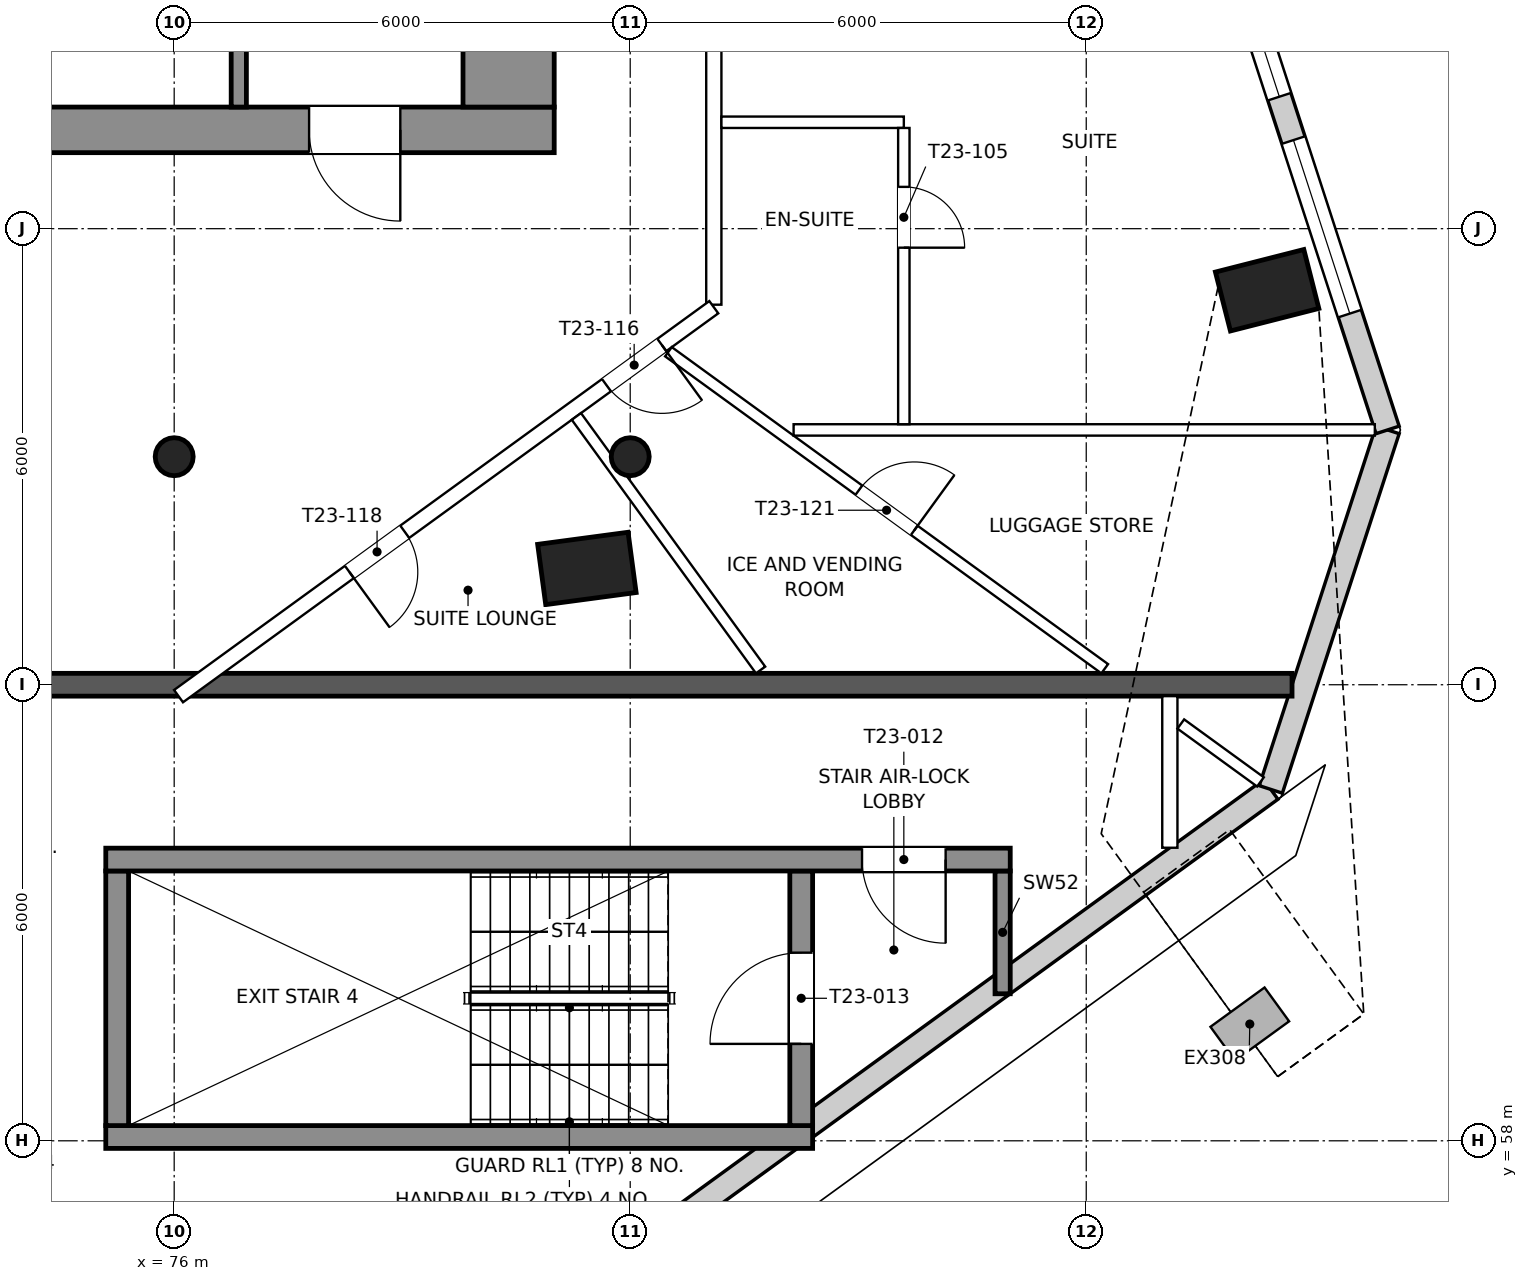
"""IFC4 building model, lengths in metres.
Left out: names, types, materials, properties, quantities, classifications, styles, units other than length and angle.
Written with IfcOpenShell. Run it as: python <this file> out.ifc"""

import sys

from ifc_helpers import new_model, si_unit, direction, frame, frame_2d, origin, origin_2d, place, context, subcontext, project, spatial, rectangle, circle, extrude, element, fill, save


model = new_model("IFC4")
c1 = context("Model", 3, precision=1e-05, world=origin(), true_north=direction((0.0, 1.0)))
c2 = subcontext(c1, "Body", "Model", "MODEL_VIEW")
j1 = project(units=[si_unit("LENGTHUNIT", "METRE"), si_unit("PLANEANGLEUNIT", "RADIAN")], contexts=[c1])
p1 = place(None, origin())
s1 = spatial("IfcSite", under=j1, at=p1, CompositionType="ELEMENT")
p2 = place(p1, origin())
s2 = spatial("IfcBuilding", under=s1, at=p2, CompositionType="ELEMENT")
p3 = place(p2, frame((0.0, 0.0, 317.8)))
s3 = spatial("IfcBuildingStorey", under=s2, at=p3, CompositionType="ELEMENT", Elevation=317.8)
for number, where, z_axis, x_axis in (
    (1, (90.38, 69.19, 0.0), (0.0, 0.0, 1.0), (0.247, -0.969, 0.0)),
    (2, (81.43, 65.53, 0.0), (0.0, 0.0, 1.0), (0.133, -0.991, 0.0)),
):
    element("IfcColumn", number, at=place(p3, frame(where, z_axis=z_axis, x_axis=x_axis)), inside=s3, PredefinedType="COLUMN", context=c2, shape_type="SweptSolid", body=[
        extrude(rectangle(XDim=0.8, YDim=1.2, at=origin_2d()), origin(), (0.0, 0.0, 1.0), 3.9),
    ])
for number, where, z_axis, x_axis in (
    (3, (76.0, 67.0, 0.0), (0.0, 0.0, 1.0), (1.0, 0.0, 0.0)),
    (4, (82.0, 67.0, 0.0), (0.0, 0.0, 1.0), (1.0, 0.0, 0.0)),
):
    element("IfcColumn", number, at=place(p3, frame(where, z_axis=z_axis, x_axis=x_axis)), inside=s3, PredefinedType="COLUMN", context=c2, shape_type="SweptSolid", body=[
        extrude(circle(Radius=0.25, at=origin_2d()), origin(), (0.0, 0.0, 1.0), 3.9),
    ])
p4 = place(p3, frame((73.427, 50.271, 0.0), z_axis=(0.0, 0.0, 1.0), x_axis=(0.809016820716, 0.587785491314, 0.0)))
e5 = element("IfcWall", 5, at=p4, inside=s3, PredefinedType="SOLIDWALL", context=c2, shape_type="SweptSolid", body=[
    extrude(rectangle(XDim=21.015, YDim=0.32, at=frame_2d((10.507, 0.0))), origin(), (0.0, 0.0, 1.0), 3.5),
])
p5 = place(p4, frame((1.807, 0.0, 0.55)))
e6 = element("IfcOpeningElement", 6, at=p5, cuts=e5, PredefinedType="OPENING", context=c2, shape_type="SweptSolid", body=[
    extrude(rectangle(XDim=2.4, YDim=2.3, at=frame_2d((1.2, 1.15))), frame((0.0, 0.17, 0.0), z_axis=(0.0, -1.0, 0.0), x_axis=(1.0, 0.0, 0.0)), (0.0, 0.0, 1.0), 0.34),
])
p6 = place(p4, frame((4.807, 0.0, 0.55)))
e7 = element("IfcOpeningElement", 7, at=p6, cuts=e5, PredefinedType="OPENING", context=c2, shape_type="SweptSolid", body=[
    extrude(rectangle(XDim=2.4, YDim=2.3, at=frame_2d((1.2, 1.15))), frame((0.0, 0.17, 0.0), z_axis=(0.0, -1.0, 0.0), x_axis=(1.0, 0.0, 0.0)), (0.0, 0.0, 1.0), 0.34),
])
p7 = place(p3, frame((90.428, 62.623, 0.0), z_axis=(0.0, 0.0, 1.0), x_axis=(0.309016131261, 0.951056796737, 0.0)))
e8 = element("IfcWall", 8, at=p7, inside=s3, PredefinedType="SOLIDWALL", context=c2, shape_type="SweptSolid", body=[
    extrude(rectangle(XDim=4.973, YDim=0.32, at=frame_2d((2.486, 0.0))), origin(), (0.0, 0.0, 1.0), 3.5),
])
p8 = place(p3, frame((91.965, 67.352, 0.0), z_axis=(0.0, 0.0, 1.0), x_axis=(-0.309018707068, 0.951055959806, 0.0)))
e9 = element("IfcWall", 9, at=p8, inside=s3, PredefinedType="SOLIDWALL", context=c2, shape_type="SweptSolid", body=[
    extrude(rectangle(XDim=17.619, YDim=0.32, at=frame_2d((8.81, 0.0))), origin(), (0.0, 0.0, 1.0), 3.5),
])
p9 = place(p8, frame((1.609, 0.0, 0.55)))
e10 = element("IfcOpeningElement", 10, at=p9, cuts=e9, PredefinedType="OPENING", context=c2, shape_type="SweptSolid", body=[
    extrude(rectangle(XDim=2.4, YDim=2.3, at=frame_2d((1.2, 1.15))), frame((0.0, 0.17, 0.0), z_axis=(0.0, -1.0, 0.0), x_axis=(1.0, 0.0, 0.0)), (0.0, 0.0, 1.0), 0.34),
])
p10 = place(p8, frame((4.609, 0.0, 0.55)))
e11 = element("IfcOpeningElement", 11, at=p10, cuts=e9, PredefinedType="OPENING", context=c2, shape_type="SweptSolid", body=[
    extrude(rectangle(XDim=2.4, YDim=2.3, at=frame_2d((1.2, 1.15))), frame((0.0, 0.17, 0.0), z_axis=(0.0, -1.0, 0.0), x_axis=(1.0, 0.0, 0.0)), (0.0, 0.0, 1.0), 0.34),
])
p11 = place(p8, frame((7.609, 0.0, 0.55)))
e12 = element("IfcOpeningElement", 12, at=p11, cuts=e9, PredefinedType="OPENING", context=c2, shape_type="SweptSolid", body=[
    extrude(rectangle(XDim=2.4, YDim=2.3, at=frame_2d((1.2, 1.15))), frame((0.0, 0.17, 0.0), z_axis=(0.0, -1.0, 0.0), x_axis=(1.0, 0.0, 0.0)), (0.0, 0.0, 1.0), 0.34),
])
p12 = place(p8, frame((10.609, 0.0, 0.55)))
e13 = element("IfcOpeningElement", 13, at=p12, cuts=e9, PredefinedType="OPENING", context=c2, shape_type="SweptSolid", body=[
    extrude(rectangle(XDim=2.4, YDim=2.3, at=frame_2d((1.2, 1.15))), frame((0.0, 0.17, 0.0), z_axis=(0.0, -1.0, 0.0), x_axis=(1.0, 0.0, 0.0)), (0.0, 0.0, 1.0), 0.34),
])
p13 = place(p8, frame((13.609, 0.0, 0.55)))
e14 = element("IfcOpeningElement", 14, at=p13, cuts=e9, PredefinedType="OPENING", context=c2, shape_type="SweptSolid", body=[
    extrude(rectangle(XDim=2.4, YDim=2.3, at=frame_2d((1.2, 1.15))), frame((0.0, 0.17, 0.0), z_axis=(0.0, -1.0, 0.0), x_axis=(1.0, 0.0, 0.0)), (0.0, 0.0, 1.0), 0.34),
])
p14 = place(p3, frame((75.1, 58.05, 0.0), z_axis=(0.0, 0.0, 1.0), x_axis=(1.0, 0.0, 0.0)))
e15 = element("IfcWall", 15, at=p14, inside=s3, PredefinedType="SHEAR", context=c2, shape_type="SweptSolid", body=[
    extrude(rectangle(XDim=9.3, YDim=0.3, at=frame_2d((4.65, 0.0))), origin(), (0.0, 0.0, 1.0), 3.9),
])
p15 = place(p3, frame((75.25, 58.2, 0.0), z_axis=(0.0, 0.0, 1.0), x_axis=(0.0, 1.0, 0.0)))
e16 = element("IfcWall", 16, at=p15, inside=s3, PredefinedType="SHEAR", context=c2, shape_type="SweptSolid", body=[
    extrude(rectangle(XDim=3.35, YDim=0.3, at=frame_2d((1.675, 0.0))), origin(), (0.0, 0.0, 1.0), 3.9),
])
p16 = place(p3, frame((84.25, 58.2, 0.0), z_axis=(0.0, 0.0, 1.0), x_axis=(0.0, 1.0, 0.0)))
e17 = element("IfcWall", 17, at=p16, inside=s3, PredefinedType="SHEAR", context=c2, shape_type="SweptSolid", body=[
    extrude(rectangle(XDim=3.35, YDim=0.3, at=frame_2d((1.675, 0.0))), origin(), (0.0, 0.0, 1.0), 3.9),
])
p17 = place(p16, frame((1.075, 0.0, 0.0)))
e18 = element("IfcOpeningElement", 18, at=p17, cuts=e17, PredefinedType="OPENING", context=c2, shape_type="SweptSolid", body=[
    extrude(rectangle(XDim=1.2, YDim=2.1, at=frame_2d((0.6, 1.05))), frame((0.0, 0.16, 0.0), z_axis=(0.0, -1.0, 0.0), x_axis=(1.0, 0.0, 0.0)), (0.0, 0.0, 1.0), 0.32),
])
p18 = place(p3, frame((86.9, 59.934, 0.0), z_axis=(0.0, 0.0, 1.0), x_axis=(0.0, 1.0, 0.0)))
e19 = element("IfcWall", 19, at=p18, inside=s3, PredefinedType="SHEAR", context=c2, shape_type="SweptSolid", body=[
    extrude(rectangle(XDim=1.616, YDim=0.2, at=frame_2d((0.808, 0.0))), origin(), (0.0, 0.0, 1.0), 3.9),
])
p19 = place(p3, frame((75.1, 61.7, 0.0), z_axis=(0.0, 0.0, 1.0), x_axis=(1.0, 0.0, 0.0)))
e20 = element("IfcWall", 20, at=p19, inside=s3, PredefinedType="SHEAR", context=c2, shape_type="SweptSolid", body=[
    extrude(rectangle(XDim=11.9, YDim=0.3, at=frame_2d((5.95, 0.0))), origin(), (0.0, 0.0, 1.0), 3.9),
])
p20 = place(p19, frame((9.95, 0.0, 0.0)))
e21 = element("IfcOpeningElement", 21, at=p20, cuts=e20, PredefinedType="OPENING", context=c2, shape_type="SweptSolid", body=[
    extrude(rectangle(XDim=1.1, YDim=2.1, at=frame_2d((0.55, 1.05))), frame((0.0, 0.16, 0.0), z_axis=(0.0, -1.0, 0.0), x_axis=(1.0, 0.0, 0.0)), (0.0, 0.0, 1.0), 0.32),
])
p21 = place(p3, frame((59.0, 71.3, 0.0), z_axis=(0.0, 0.0, 1.0), x_axis=(1.0, 0.0, 0.0)))
e22 = element("IfcWall", 22, at=p21, inside=s3, PredefinedType="SHEAR", context=c2, shape_type="SweptSolid", body=[
    extrude(rectangle(XDim=22.0, YDim=0.6, at=frame_2d((11.0, 0.0))), origin(), (0.0, 0.0, 1.0), 3.9),
])
p22 = place(p21, frame((2.025, 0.0, 0.0)))
e23 = element("IfcOpeningElement", 23, at=p22, cuts=e22, PredefinedType="OPENING", context=c2, shape_type="SweptSolid", body=[
    extrude(rectangle(XDim=1.2, YDim=2.1, at=frame_2d((0.6, 1.05))), frame((0.0, 0.31, 0.0), z_axis=(0.0, -1.0, 0.0), x_axis=(1.0, 0.0, 0.0)), (0.0, 0.0, 1.0), 0.62),
])
p23 = place(p21, frame((18.775, 0.0, 0.0)))
e24 = element("IfcOpeningElement", 24, at=p23, cuts=e22, PredefinedType="OPENING", context=c2, shape_type="SweptSolid", body=[
    extrude(rectangle(XDim=1.2, YDim=2.1, at=frame_2d((0.6, 1.05))), frame((0.0, 0.31, 0.0), z_axis=(0.0, -1.0, 0.0), x_axis=(1.0, 0.0, 0.0)), (0.0, 0.0, 1.0), 0.62),
])
p24 = place(p21, frame((10.0, 0.0, 0.0)))
e25 = element("IfcOpeningElement", 25, at=p24, cuts=e22, PredefinedType="OPENING", context=c2, shape_type="SweptSolid", body=[
    extrude(rectangle(XDim=2.0, YDim=2.1, at=frame_2d((1.0, 1.05))), frame((0.0, 0.31, 0.0), z_axis=(0.0, -1.0, 0.0), x_axis=(1.0, 0.0, 0.0)), (0.0, 0.0, 1.0), 0.62),
])
p25 = place(p3, frame((76.85, 71.6, 0.0), z_axis=(0.0, 0.0, 1.0), x_axis=(0.0, 1.0, 0.0)))
e26 = element("IfcWall", 26, at=p25, inside=s3, PredefinedType="SHEAR", context=c2, shape_type="SweptSolid", body=[
    extrude(rectangle(XDim=3.4, YDim=0.2, at=frame_2d((1.7, 0.0))), origin(), (0.0, 0.0, 1.0), 3.9),
])
p26 = place(p3, frame((80.4, 71.6, 0.0), z_axis=(0.0, 0.0, 1.0), x_axis=(0.0, 1.0, 0.0)))
e27 = element("IfcWall", 27, at=p26, inside=s3, PredefinedType="SHEAR", context=c2, shape_type="SweptSolid", body=[
    extrude(rectangle(XDim=9.3, YDim=1.2, at=frame_2d((4.65, 0.0))), origin(), (0.0, 0.0, 1.0), 3.9),
])
p27 = place(p3, frame((49.292, 64.0, 0.0), z_axis=(0.0, 0.0, 1.0), x_axis=(1.0, 0.0, 0.0)))
e28 = element("IfcWall", 28, at=p27, inside=s3, PredefinedType="PARTITIONING", context=c2, shape_type="SweptSolid", body=[
    extrude(rectangle(XDim=41.415, YDim=0.3, at=frame_2d((20.708, 0.0))), origin(), (0.0, 0.0, 1.0), 3.0),
])
p28 = place(p27, frame((16.576, 0.0, 0.0)))
e29 = element("IfcOpeningElement", 29, at=p28, cuts=e28, PredefinedType="OPENING", context=c2, shape_type="SweptSolid", body=[
    extrude(rectangle(XDim=2.0, YDim=2.1, at=frame_2d((1.0, 1.05))), frame((0.0, 0.16, 0.0), z_axis=(0.0, -1.0, 0.0), x_axis=(1.0, 0.0, 0.0)), (0.0, 0.0, 1.0), 0.32),
])
p29 = place(p27, frame((22.839, 0.0, 0.0)))
e30 = element("IfcOpeningElement", 30, at=p29, cuts=e28, PredefinedType="OPENING", context=c2, shape_type="SweptSolid", body=[
    extrude(rectangle(XDim=2.0, YDim=2.1, at=frame_2d((1.0, 1.05))), frame((0.0, 0.16, 0.0), z_axis=(0.0, -1.0, 0.0), x_axis=(1.0, 0.0, 0.0)), (0.0, 0.0, 1.0), 0.32),
])
p30 = place(p3, frame((83.1, 86.396, 0.0), z_axis=(0.0, 0.0, 1.0), x_axis=(0.0, -1.0, 0.0)))
e31 = element("IfcWall", 31, at=p30, inside=s3, PredefinedType="PARTITIONING", context=c2, shape_type="SweptSolid", body=[
    extrude(rectangle(XDim=17.396, YDim=0.2, at=frame_2d((8.698, 0.0))), origin(), (0.0, 0.0, 1.0), 3.05),
])
p31 = place(p30, frame((2.159, 0.0, 0.0)))
e32 = element("IfcOpeningElement", 32, at=p31, cuts=e31, PredefinedType="OPENING", context=c2, shape_type="SweptSolid", body=[
    extrude(rectangle(XDim=0.9, YDim=2.1, at=frame_2d((0.45, 1.05))), frame((0.0, 0.11, 0.0), z_axis=(0.0, -1.0, 0.0), x_axis=(1.0, 0.0, 0.0)), (0.0, 0.0, 1.0), 0.22),
])
p32 = place(p30, frame((5.202, 0.0, 0.0)))
e33 = element("IfcOpeningElement", 33, at=p32, cuts=e31, PredefinedType="OPENING", context=c2, shape_type="SweptSolid", body=[
    extrude(rectangle(XDim=0.9, YDim=2.1, at=frame_2d((0.45, 1.05))), frame((0.0, 0.11, 0.0), z_axis=(0.0, -1.0, 0.0), x_axis=(1.0, 0.0, 0.0)), (0.0, 0.0, 1.0), 0.22),
])
p33 = place(p30, frame((12.009, 0.0, 0.0)))
e34 = element("IfcOpeningElement", 34, at=p33, cuts=e31, PredefinedType="OPENING", context=c2, shape_type="SweptSolid", body=[
    extrude(rectangle(XDim=0.9, YDim=2.1, at=frame_2d((0.45, 1.05))), frame((0.0, 0.11, 0.0), z_axis=(0.0, -1.0, 0.0), x_axis=(1.0, 0.0, 0.0)), (0.0, 0.0, 1.0), 0.22),
])
p34 = place(p3, frame((83.1, 68.967, 0.0), z_axis=(0.0, 0.0, 1.0), x_axis=(-0.809024626779, -0.587774747046, 0.0)))
e35 = element("IfcWall", 35, at=p34, inside=s3, PredefinedType="PARTITIONING", context=c2, shape_type="SweptSolid", body=[
    extrude(rectangle(XDim=8.705, YDim=0.2, at=frame_2d((4.353, 0.0))), origin(), (0.0, 0.0, 1.0), 3.5),
])
p35 = place(p34, frame((0.845, 0.0, 0.0)))
e36 = element("IfcOpeningElement", 36, at=p35, cuts=e35, PredefinedType="OPENING", context=c2, shape_type="SweptSolid", body=[
    extrude(rectangle(XDim=0.9, YDim=2.1, at=frame_2d((0.45, 1.05))), frame((0.0, 0.11, 0.0), z_axis=(0.0, -1.0, 0.0), x_axis=(1.0, 0.0, 0.0)), (0.0, 0.0, 1.0), 0.22),
])
p36 = place(p34, frame((5.026, 0.0, 0.0)))
e37 = element("IfcOpeningElement", 37, at=p36, cuts=e35, PredefinedType="OPENING", context=c2, shape_type="SweptSolid", body=[
    extrude(rectangle(XDim=0.9, YDim=2.1, at=frame_2d((0.45, 1.05))), frame((0.0, 0.11, 0.0), z_axis=(0.0, -1.0, 0.0), x_axis=(1.0, 0.0, 0.0)), (0.0, 0.0, 1.0), 0.22),
])
p37 = place(p3, frame((89.1, 63.85, 0.0), z_axis=(0.0, 0.0, 1.0), x_axis=(0.0, -1.0, 0.0)))
e38 = element("IfcWall", 38, at=p37, inside=s3, PredefinedType="PARTITIONING", context=c2, shape_type="SweptSolid", body=[
    extrude(rectangle(XDim=1.995, YDim=0.2, at=frame_2d((0.997, 0.0))), origin(), (0.0, 0.0, 1.0), 3.5),
])
p38 = place(p3, frame((90.292, 62.722, 0.0), z_axis=(0.0, 0.0, 1.0), x_axis=(-0.808931599774, 0.587902769927, 0.0)))
e39 = element("IfcWall", 39, at=p38, inside=s3, PredefinedType="PARTITIONING", context=c2, shape_type="SweptSolid", body=[
    extrude(rectangle(XDim=1.296, YDim=0.15, at=frame_2d((0.648, 0.0))), origin(), (0.0, 0.0, 1.0), 3.5),
])
p39 = place(p3, frame((88.243, 64.211, 0.0), z_axis=(0.0, 0.0, 1.0), x_axis=(-0.809012762511, 0.587791076909, 0.0)))
e40 = element("IfcWall", 40, at=p39, inside=s3, PredefinedType="PARTITIONING", context=c2, shape_type="SweptSolid", body=[
    extrude(rectangle(XDim=7.095, YDim=0.15, at=frame_2d((3.547, 0.0))), origin(), (0.0, 0.0, 1.0), 3.05),
])
p40 = place(p39, frame((3.097, 0.0, 0.0)))
e41 = element("IfcOpeningElement", 41, at=p40, cuts=e40, PredefinedType="OPENING", context=c2, shape_type="SweptSolid", body=[
    extrude(rectangle(XDim=0.9, YDim=2.1, at=frame_2d((0.45, 1.05))), frame((0.0, 0.085, 0.0), z_axis=(0.0, -1.0, 0.0), x_axis=(1.0, 0.0, 0.0)), (0.0, 0.0, 1.0), 0.17),
])
p41 = place(p3, frame((91.797, 67.352, 0.0), z_axis=(0.0, 0.0, 1.0), x_axis=(-1.0, 0.0, 0.0)))
e42 = element("IfcWall", 42, at=p41, inside=s3, PredefinedType="PARTITIONING", context=c2, shape_type="SweptSolid", body=[
    extrude(rectangle(XDim=7.647, YDim=0.15, at=frame_2d((3.824, 0.0))), origin(), (0.0, 0.0, 1.0), 3.05),
])
p42 = place(p3, frame((83.715, 64.194, 0.0), z_axis=(0.0, 0.0, 1.0), x_axis=(-0.587756163253, 0.809038128, 0.0)))
e43 = element("IfcWall", 43, at=p42, inside=s3, PredefinedType="PARTITIONING", context=c2, shape_type="SweptSolid", body=[
    extrude(rectangle(XDim=4.123, YDim=0.15, at=frame_2d((2.062, 0.0))), origin(), (0.0, 0.0, 1.0), 3.5),
])
p43 = place(p3, frame((83.2, 71.4, 0.0), z_axis=(0.0, 0.0, 1.0), x_axis=(1.0, 0.0, 0.0)))
e44 = element("IfcWall", 44, at=p43, inside=s3, PredefinedType="PARTITIONING", context=c2, shape_type="SweptSolid", body=[
    extrude(rectangle(XDim=2.4, YDim=0.15, at=frame_2d((1.2, 0.0))), origin(), (0.0, 0.0, 1.0), 3.5),
])
p44 = place(p3, frame((85.6, 67.427, 0.0), z_axis=(0.0, 0.0, 1.0), x_axis=(0.0, 1.0, 0.0)))
e45 = element("IfcWall", 45, at=p44, inside=s3, PredefinedType="PARTITIONING", context=c2, shape_type="SweptSolid", body=[
    extrude(rectangle(XDim=3.897, YDim=0.15, at=frame_2d((1.949, 0.0))), origin(), (0.0, 0.0, 1.0), 3.5),
])
p45 = place(p44, frame((2.323, 0.0, 0.0)))
e46 = element("IfcOpeningElement", 46, at=p45, cuts=e45, PredefinedType="OPENING", context=c2, shape_type="SweptSolid", body=[
    extrude(rectangle(XDim=0.8, YDim=2.1, at=frame_2d((0.4, 1.05))), frame((0.0, 0.085, 0.0), z_axis=(0.0, -1.0, 0.0), x_axis=(1.0, 0.0, 0.0)), (0.0, 0.0, 1.0), 0.17),
])
p46 = place(p9, origin())
e47 = element("IfcWindow", 47, at=p46, inside=s3, PartitioningType="SINGLE_PANEL", PredefinedType="WINDOW", context=c2, shape_type="SweptSolid", body=[
    extrude(rectangle(XDim=2.4, YDim=2.3, at=frame_2d((1.2, 1.15))), frame((0.0, 0.07, 0.0), z_axis=(0.0, -1.0, 0.0), x_axis=(1.0, 0.0, 0.0)), (0.0, 0.0, 1.0), 0.06),
])
fill(e10, e47)
p47 = place(p10, origin())
e48 = element("IfcWindow", 48, at=p47, inside=s3, PartitioningType="SINGLE_PANEL", PredefinedType="WINDOW", context=c2, shape_type="SweptSolid", body=[
    extrude(rectangle(XDim=2.4, YDim=2.3, at=frame_2d((1.2, 1.15))), frame((0.0, 0.07, 0.0), z_axis=(0.0, -1.0, 0.0), x_axis=(1.0, 0.0, 0.0)), (0.0, 0.0, 1.0), 0.06),
])
fill(e11, e48)
p48 = place(p23, frame((1.2, 0.0, 0.0), z_axis=(0.0, 0.0, 1.0), x_axis=(-1.0, 0.0, 0.0)))
e49 = element("IfcDoor", 49, at=p48, inside=s3, OperationType="SINGLE_SWING_LEFT", PredefinedType="DOOR", context=c2, shape_type="SweptSolid", body=[
    extrude(rectangle(XDim=1.2, YDim=2.1, at=frame_2d((0.6, 1.05))), frame((0.0, 0.025, 0.0), z_axis=(0.0, -1.0, 0.0), x_axis=(1.0, 0.0, 0.0)), (0.0, 0.0, 1.0), 0.05),
])
fill(e24, e49)
p49 = place(p20, frame((1.1, 0.0, 0.0), z_axis=(0.0, 0.0, 1.0), x_axis=(-1.0, 0.0, 0.0)))
e50 = element("IfcDoor", 50, at=p49, inside=s3, OperationType="SINGLE_SWING_LEFT", PredefinedType="DOOR", context=c2, shape_type="SweptSolid", body=[
    extrude(rectangle(XDim=1.1, YDim=2.1, at=frame_2d((0.55, 1.05))), frame((0.0, 0.025, 0.0), z_axis=(0.0, -1.0, 0.0), x_axis=(1.0, 0.0, 0.0)), (0.0, 0.0, 1.0), 0.05),
])
fill(e21, e50)
p50 = place(p17, origin())
e51 = element("IfcDoor", 51, at=p50, inside=s3, OperationType="SINGLE_SWING_LEFT", PredefinedType="DOOR", context=c2, shape_type="SweptSolid", body=[
    extrude(rectangle(XDim=1.2, YDim=2.1, at=frame_2d((0.6, 1.05))), frame((0.0, 0.025, 0.0), z_axis=(0.0, -1.0, 0.0), x_axis=(1.0, 0.0, 0.0)), (0.0, 0.0, 1.0), 0.05),
])
fill(e18, e51)
p51 = place(p45, frame((0.8, 0.0, 0.0), z_axis=(0.0, 0.0, 1.0), x_axis=(-1.0, 0.0, 0.0)))
e52 = element("IfcDoor", 52, at=p51, inside=s3, OperationType="SINGLE_SWING_RIGHT", PredefinedType="DOOR", context=c2, shape_type="SweptSolid", body=[
    extrude(rectangle(XDim=0.8, YDim=2.1, at=frame_2d((0.4, 1.05))), frame((0.0, 0.025, 0.0), z_axis=(0.0, -1.0, 0.0), x_axis=(1.0, 0.0, 0.0)), (0.0, 0.0, 1.0), 0.05),
])
fill(e46, e52)
p52 = place(p35, origin())
e53 = element("IfcDoor", 53, at=p52, inside=s3, OperationType="SINGLE_SWING_LEFT", PredefinedType="DOOR", context=c2, shape_type="SweptSolid", body=[
    extrude(rectangle(XDim=0.9, YDim=2.1, at=frame_2d((0.45, 1.05))), frame((0.0, 0.025, 0.0), z_axis=(0.0, -1.0, 0.0), x_axis=(1.0, 0.0, 0.0)), (0.0, 0.0, 1.0), 0.05),
])
fill(e36, e53)
p53 = place(p36, origin())
e54 = element("IfcDoor", 54, at=p53, inside=s3, OperationType="SINGLE_SWING_RIGHT", PredefinedType="DOOR", context=c2, shape_type="SweptSolid", body=[
    extrude(rectangle(XDim=0.9, YDim=2.1, at=frame_2d((0.45, 1.05))), frame((0.0, 0.025, 0.0), z_axis=(0.0, -1.0, 0.0), x_axis=(1.0, 0.0, 0.0)), (0.0, 0.0, 1.0), 0.05),
])
fill(e37, e54)
p54 = place(p40, frame((0.9, 0.0, 0.0), z_axis=(0.0, 0.0, 1.0), x_axis=(-1.0, 0.0, 0.0)))
e55 = element("IfcDoor", 55, at=p54, inside=s3, OperationType="SINGLE_SWING_RIGHT", PredefinedType="DOOR", context=c2, shape_type="SweptSolid", body=[
    extrude(rectangle(XDim=0.9, YDim=2.1, at=frame_2d((0.45, 1.05))), frame((0.0, 0.025, 0.0), z_axis=(0.0, -1.0, 0.0), x_axis=(1.0, 0.0, 0.0)), (0.0, 0.0, 1.0), 0.05),
])
fill(e41, e55)
save(model, sys.argv[1])
